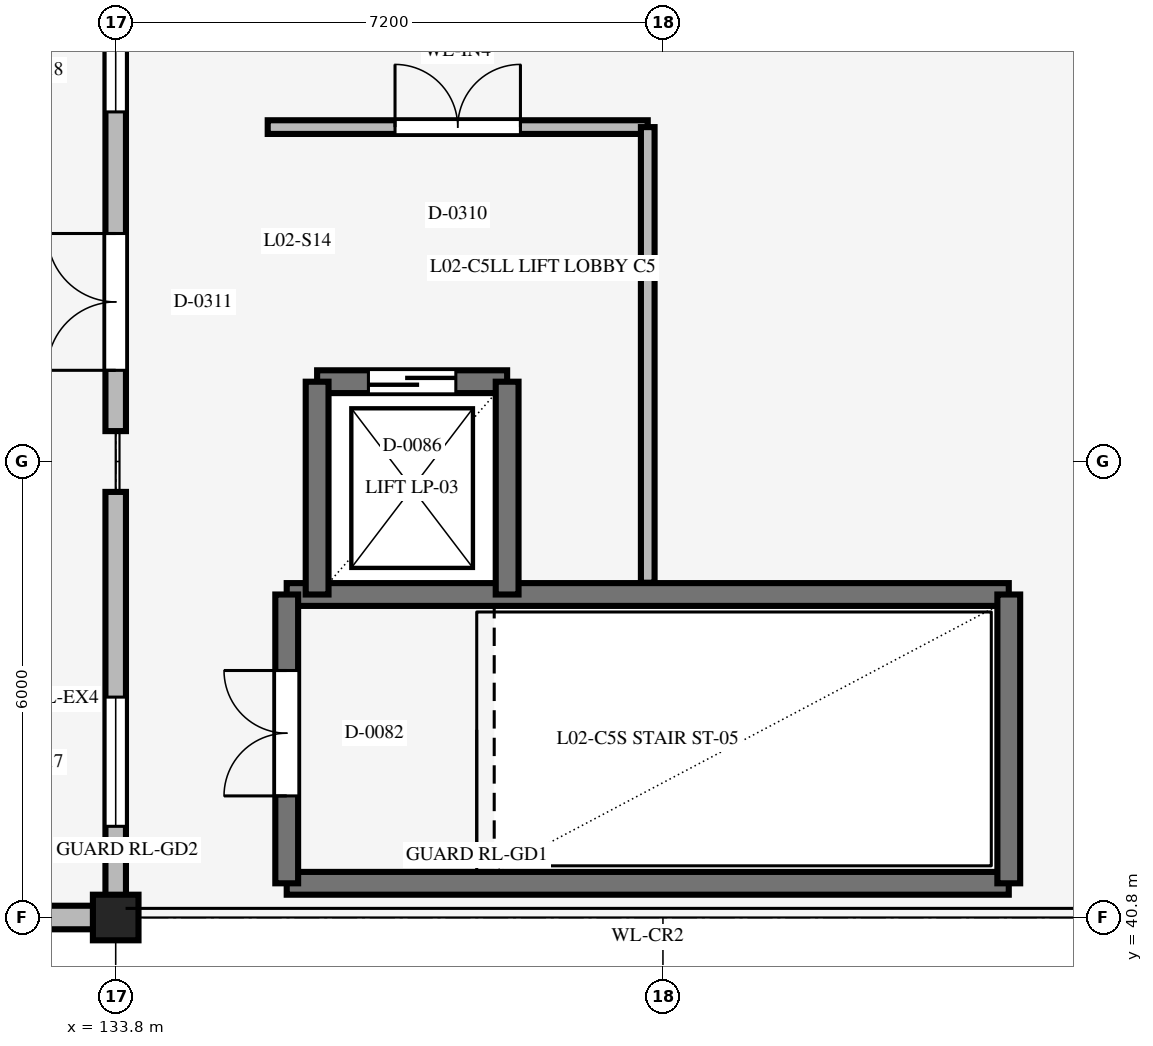
"""IFC4 building model, lengths in metres.
Left out: names, types, materials, properties, quantities, classifications, styles, units other than length and angle.
Written with IfcOpenShell. Run it as: python <this file> out.ifc"""

import sys

from ifc_helpers import new_model, si_unit, direction, frame, frame_2d, origin, origin_2d, place, context, subcontext, project, spatial, rectangle, extrude, element, fill, save


model = new_model("IFC4")
c1 = context("Model", 3, precision=1e-05, world=origin(), true_north=direction((0.0, 1.0)))
c2 = subcontext(c1, "Body", "Model", "MODEL_VIEW")
j1 = project(units=[si_unit("LENGTHUNIT", "METRE"), si_unit("PLANEANGLEUNIT", "RADIAN")], contexts=[c1])
p1 = place(None, origin())
s1 = spatial("IfcSite", under=j1, at=p1, CompositionType="ELEMENT")
p2 = place(p1, origin())
s2 = spatial("IfcBuilding", under=s1, at=p2, CompositionType="ELEMENT")
p3 = place(p2, frame((0.0, 0.0, 12.0)))
s3 = spatial("IfcBuildingStorey", under=s2, at=p3, CompositionType="ELEMENT", Elevation=12.0)
p4 = place(p3, frame((133.8, 40.8, 0.0), z_axis=(0.0, 0.0, 1.0), x_axis=(1.0, 0.0, 0.0)))
e1 = element("IfcColumn", 1, at=p4, inside=s3, PredefinedType="COLUMN", context=c2, shape_type="SweptSolid", body=[
    extrude(rectangle(XDim=0.6, YDim=0.6, at=origin_2d()), origin(), (0.0, 0.0, 1.0), 3.9),
])
for number, where, z_axis, x_axis in (
    (2, (145.55, 41.25, 0.0), (0.0, 0.0, 1.0), (-1.0, 0.0, 0.0)),
    (3, (136.05, 45.05, 0.0), (0.0, 0.0, 1.0), (1.0, 0.0, 0.0)),
):
    element("IfcWall", number, at=place(p3, frame(where, z_axis=z_axis, x_axis=x_axis)), inside=s3, PredefinedType="SHEAR", context=c2, shape_type="SweptSolid", body=[
        extrude(rectangle(XDim=9.5, YDim=0.3, at=frame_2d((4.75, 0.0))), origin(), (0.0, 0.0, 1.0), 3.3),
    ])
p5 = place(p3, frame((136.05, 41.25, 0.0), z_axis=(0.0, 0.0, 1.0), x_axis=(0.0, 1.0, 0.0)))
e4 = element("IfcWall", 4, at=p5, inside=s3, PredefinedType="SHEAR", context=c2, shape_type="SweptSolid", body=[
    extrude(rectangle(XDim=3.8, YDim=0.3, at=frame_2d((1.9, 0.0))), origin(), (0.0, 0.0, 1.0), 3.3),
])
p6 = place(p5, frame((1.15, 0.0, 0.0)))
e5 = element("IfcOpeningElement", 5, at=p6, cuts=e4, PredefinedType="OPENING", context=c2, shape_type="SweptSolid", body=[
    extrude(rectangle(XDim=1.65, YDim=2.2, at=frame_2d((0.825, 1.1))), frame((0.0, 0.16, 0.0), z_axis=(0.0, -1.0, 0.0), x_axis=(1.0, 0.0, 0.0)), (0.0, 0.0, 1.0), 0.32),
])
p7 = place(p3, frame((145.55, 41.25, 0.0), z_axis=(0.0, 0.0, 1.0), x_axis=(0.0, 1.0, 0.0)))
e6 = element("IfcWall", 6, at=p7, inside=s3, PredefinedType="SHEAR", context=c2, shape_type="SweptSolid", body=[
    extrude(rectangle(XDim=3.8, YDim=0.3, at=frame_2d((1.9, 0.0))), origin(), (0.0, 0.0, 1.0), 3.3),
])
p8 = place(p3, frame((136.45, 47.85, 0.0), z_axis=(0.0, 0.0, 1.0), x_axis=(1.0, 0.0, 0.0)))
e7 = element("IfcWall", 7, at=p8, inside=s3, PredefinedType="SHEAR", context=c2, shape_type="SweptSolid", body=[
    extrude(rectangle(XDim=2.5, YDim=0.3, at=frame_2d((1.25, 0.0))), origin(), (0.0, 0.0, 1.0), 3.4),
])
p9 = place(p8, frame((0.675, 0.0, 0.0)))
e8 = element("IfcOpeningElement", 8, at=p9, cuts=e7, PredefinedType="OPENING", context=c2, shape_type="SweptSolid", body=[
    extrude(rectangle(XDim=1.15, YDim=2.2, at=frame_2d((0.575, 1.1))), frame((0.0, 0.16, 0.0), z_axis=(0.0, -1.0, 0.0), x_axis=(1.0, 0.0, 0.0)), (0.0, 0.0, 1.0), 0.32),
])
for number, where, z_axis, x_axis in (
    (9, (136.45, 45.05, 0.0), (0.0, 0.0, 1.0), (0.0, 1.0, 0.0)),
    (10, (138.95, 45.05, 0.0), (0.0, 0.0, 1.0), (0.0, 1.0, 0.0)),
):
    element("IfcWall", number, at=place(p3, frame(where, z_axis=z_axis, x_axis=x_axis)), inside=s3, PredefinedType="SHEAR", context=c2, shape_type="SweptSolid", body=[
        extrude(rectangle(XDim=2.8, YDim=0.3, at=frame_2d((1.4, 0.0))), origin(), (0.0, 0.0, 1.0), 3.4),
    ])
p10 = place(p3, frame((133.75, 40.8, 0.0), z_axis=(0.0, 0.0, 1.0), x_axis=(-1.0, 0.0, 0.0)))
e11 = element("IfcWall", 11, at=p10, inside=s3, PredefinedType="STANDARD", context=c2, shape_type="SweptSolid", body=[
    extrude(rectangle(XDim=8.995, YDim=0.31, at=frame_2d((4.498, 0.0))), origin(), (0.0, 0.0, 1.0), 7.835),
])
p11 = place(p10, frame((2.3, 0.0, 5.4)))
e12 = element("IfcOpeningElement", 12, at=p11, cuts=e11, PredefinedType="OPENING", context=c2, shape_type="SweptSolid", body=[
    extrude(rectangle(XDim=3.6, YDim=1.5, at=frame_2d((1.8, 0.75))), frame((0.0, 0.165, 0.0), z_axis=(0.0, -1.0, 0.0), x_axis=(1.0, 0.0, 0.0)), (0.0, 0.0, 1.0), 0.33),
])
p12 = place(p3, frame((133.8, 40.96, 0.0), z_axis=(0.0, 0.0, 1.0), x_axis=(0.0, 1.0, 0.0)))
e13 = element("IfcWall", 13, at=p12, inside=s3, PredefinedType="STANDARD", context=c2, shape_type="SweptSolid", body=[
    extrude(rectangle(XDim=5.44, YDim=0.27, at=frame_2d((2.72, 0.0))), origin(), (0.0, 0.0, 1.0), 8.8),
])
p13 = place(p12, frame((1.04, 0.0, 0.8)))
e14 = element("IfcOpeningElement", 14, at=p13, cuts=e13, PredefinedType="OPENING", context=c2, shape_type="SweptSolid", body=[
    extrude(rectangle(XDim=1.7, YDim=1.8, at=frame_2d((0.85, 0.9))), frame((0.0, 0.145, 0.0), z_axis=(0.0, -1.0, 0.0), x_axis=(1.0, 0.0, 0.0)), (0.0, 0.0, 1.0), 0.29),
])
p14 = place(p3, frame((133.8, 47.2, 0.0), z_axis=(0.0, 0.0, 1.0), x_axis=(0.0, 1.0, 0.0)))
e15 = element("IfcWall", 15, at=p14, inside=s3, PredefinedType="STANDARD", context=c2, shape_type="SweptSolid", body=[
    extrude(rectangle(XDim=7.0, YDim=0.27, at=frame_2d((3.5, 0.0))), origin(), (0.0, 0.0, 1.0), 8.8),
])
p15 = place(p14, frame((4.2, 0.0, 0.8)))
e16 = element("IfcOpeningElement", 16, at=p15, cuts=e15, PredefinedType="OPENING", context=c2, shape_type="SweptSolid", body=[
    extrude(rectangle(XDim=1.1, YDim=2.2, at=frame_2d((0.55, 1.1))), frame((0.0, 0.145, 0.0), z_axis=(0.0, -1.0, 0.0), x_axis=(1.0, 0.0, 0.0)), (0.0, 0.0, 1.0), 0.29),
])
p16 = place(p14, frame((0.8, 0.0, 0.0)))
e17 = element("IfcOpeningElement", 17, at=p16, cuts=e15, PredefinedType="OPENING", context=c2, shape_type="SweptSolid", body=[
    extrude(rectangle(XDim=1.8, YDim=2.3, at=frame_2d((0.9, 1.15))), frame((0.0, 0.145, 0.0), z_axis=(0.0, -1.0, 0.0), x_axis=(1.0, 0.0, 0.0)), (0.0, 0.0, 1.0), 0.29),
])
p17 = place(p3, frame((135.8, 51.2, 0.0), z_axis=(0.0, 0.0, 1.0), x_axis=(1.0, 0.0, 0.0)))
e18 = element("IfcWall", 18, at=p17, inside=s3, PredefinedType="STANDARD", context=c2, shape_type="SweptSolid", body=[
    extrude(rectangle(XDim=5.0, YDim=0.18, at=frame_2d((2.5, 0.0))), origin(), (0.0, 0.0, 1.0), 3.05),
])
p18 = place(p17, frame((1.675, 0.0, 0.0)))
e19 = element("IfcOpeningElement", 19, at=p18, cuts=e18, PredefinedType="OPENING", context=c2, shape_type="SweptSolid", body=[
    extrude(rectangle(XDim=1.65, YDim=2.2, at=frame_2d((0.825, 1.1))), frame((0.0, 0.1, 0.0), z_axis=(0.0, -1.0, 0.0), x_axis=(1.0, 0.0, 0.0)), (0.0, 0.0, 1.0), 0.2),
])
p19 = place(p3, frame((140.8, 45.205, 0.0), z_axis=(0.0, 0.0, 1.0), x_axis=(0.0, 1.0, 0.0)))
e20 = element("IfcWall", 20, at=p19, inside=s3, PredefinedType="STANDARD", context=c2, shape_type="SweptSolid", body=[
    extrude(rectangle(XDim=5.995, YDim=0.18, at=frame_2d((2.998, 0.0))), origin(), (0.0, 0.0, 1.0), 3.05),
])
p20 = place(p13, origin())
e21 = element("IfcWindow", 21, at=p20, inside=s3, PartitioningType="SINGLE_PANEL", PredefinedType="WINDOW", context=c2, shape_type="SweptSolid", body=[
    extrude(rectangle(XDim=1.7, YDim=1.8, at=frame_2d((0.85, 0.9))), frame((0.0, 0.03, 0.0), z_axis=(0.0, -1.0, 0.0), x_axis=(1.0, 0.0, 0.0)), (0.0, 0.0, 1.0), 0.06),
])
fill(e14, e21)
p21 = place(p15, origin())
e22 = element("IfcWindow", 22, at=p21, inside=s3, PartitioningType="SINGLE_PANEL", PredefinedType="WINDOW", context=c2, shape_type="SweptSolid", body=[
    extrude(rectangle(XDim=1.1, YDim=2.2, at=frame_2d((0.55, 1.1))), frame((0.0, 0.03, 0.0), z_axis=(0.0, -1.0, 0.0), x_axis=(1.0, 0.0, 0.0)), (0.0, 0.0, 1.0), 0.06),
])
fill(e16, e22)
p22 = place(p6, origin())
e23 = element("IfcDoor", 23, at=p22, inside=s3, OperationType="DOUBLE_DOOR_SINGLE_SWING", PredefinedType="DOOR", context=c2, shape_type="SweptSolid", body=[
    extrude(rectangle(XDim=1.65, YDim=2.2, at=frame_2d((0.825, 1.1))), frame((0.0, 0.025, 0.0), z_axis=(0.0, -1.0, 0.0), x_axis=(1.0, 0.0, 0.0)), (0.0, 0.0, 1.0), 0.05),
])
fill(e5, e23)
p23 = place(p9, origin())
e24 = element("IfcDoor", 24, at=p23, inside=s3, OperationType="DOUBLE_DOOR_SLIDING", PredefinedType="DOOR", context=c2, shape_type="SweptSolid", body=[
    extrude(rectangle(XDim=1.15, YDim=2.2, at=frame_2d((0.575, 1.1))), frame((0.0, 0.025, 0.0), z_axis=(0.0, -1.0, 0.0), x_axis=(1.0, 0.0, 0.0)), (0.0, 0.0, 1.0), 0.05),
])
fill(e8, e24)
p24 = place(p18, origin())
e25 = element("IfcDoor", 25, at=p24, inside=s3, OperationType="DOUBLE_DOOR_SINGLE_SWING", PredefinedType="DOOR", context=c2, shape_type="SweptSolid", body=[
    extrude(rectangle(XDim=1.65, YDim=2.2, at=frame_2d((0.825, 1.1))), frame((0.0, 0.025, 0.0), z_axis=(0.0, -1.0, 0.0), x_axis=(1.0, 0.0, 0.0)), (0.0, 0.0, 1.0), 0.05),
])
fill(e19, e25)
p25 = place(p16, origin())
e26 = element("IfcDoor", 26, at=p25, inside=s3, OperationType="DOUBLE_DOOR_SINGLE_SWING", PredefinedType="DOOR", context=c2, shape_type="SweptSolid", body=[
    extrude(rectangle(XDim=1.8, YDim=2.3, at=frame_2d((0.9, 1.15))), frame((0.0, 0.025, 0.0), z_axis=(0.0, -1.0, 0.0), x_axis=(1.0, 0.0, 0.0)), (0.0, 0.0, 1.0), 0.05),
])
fill(e17, e26)
save(model, sys.argv[1])
